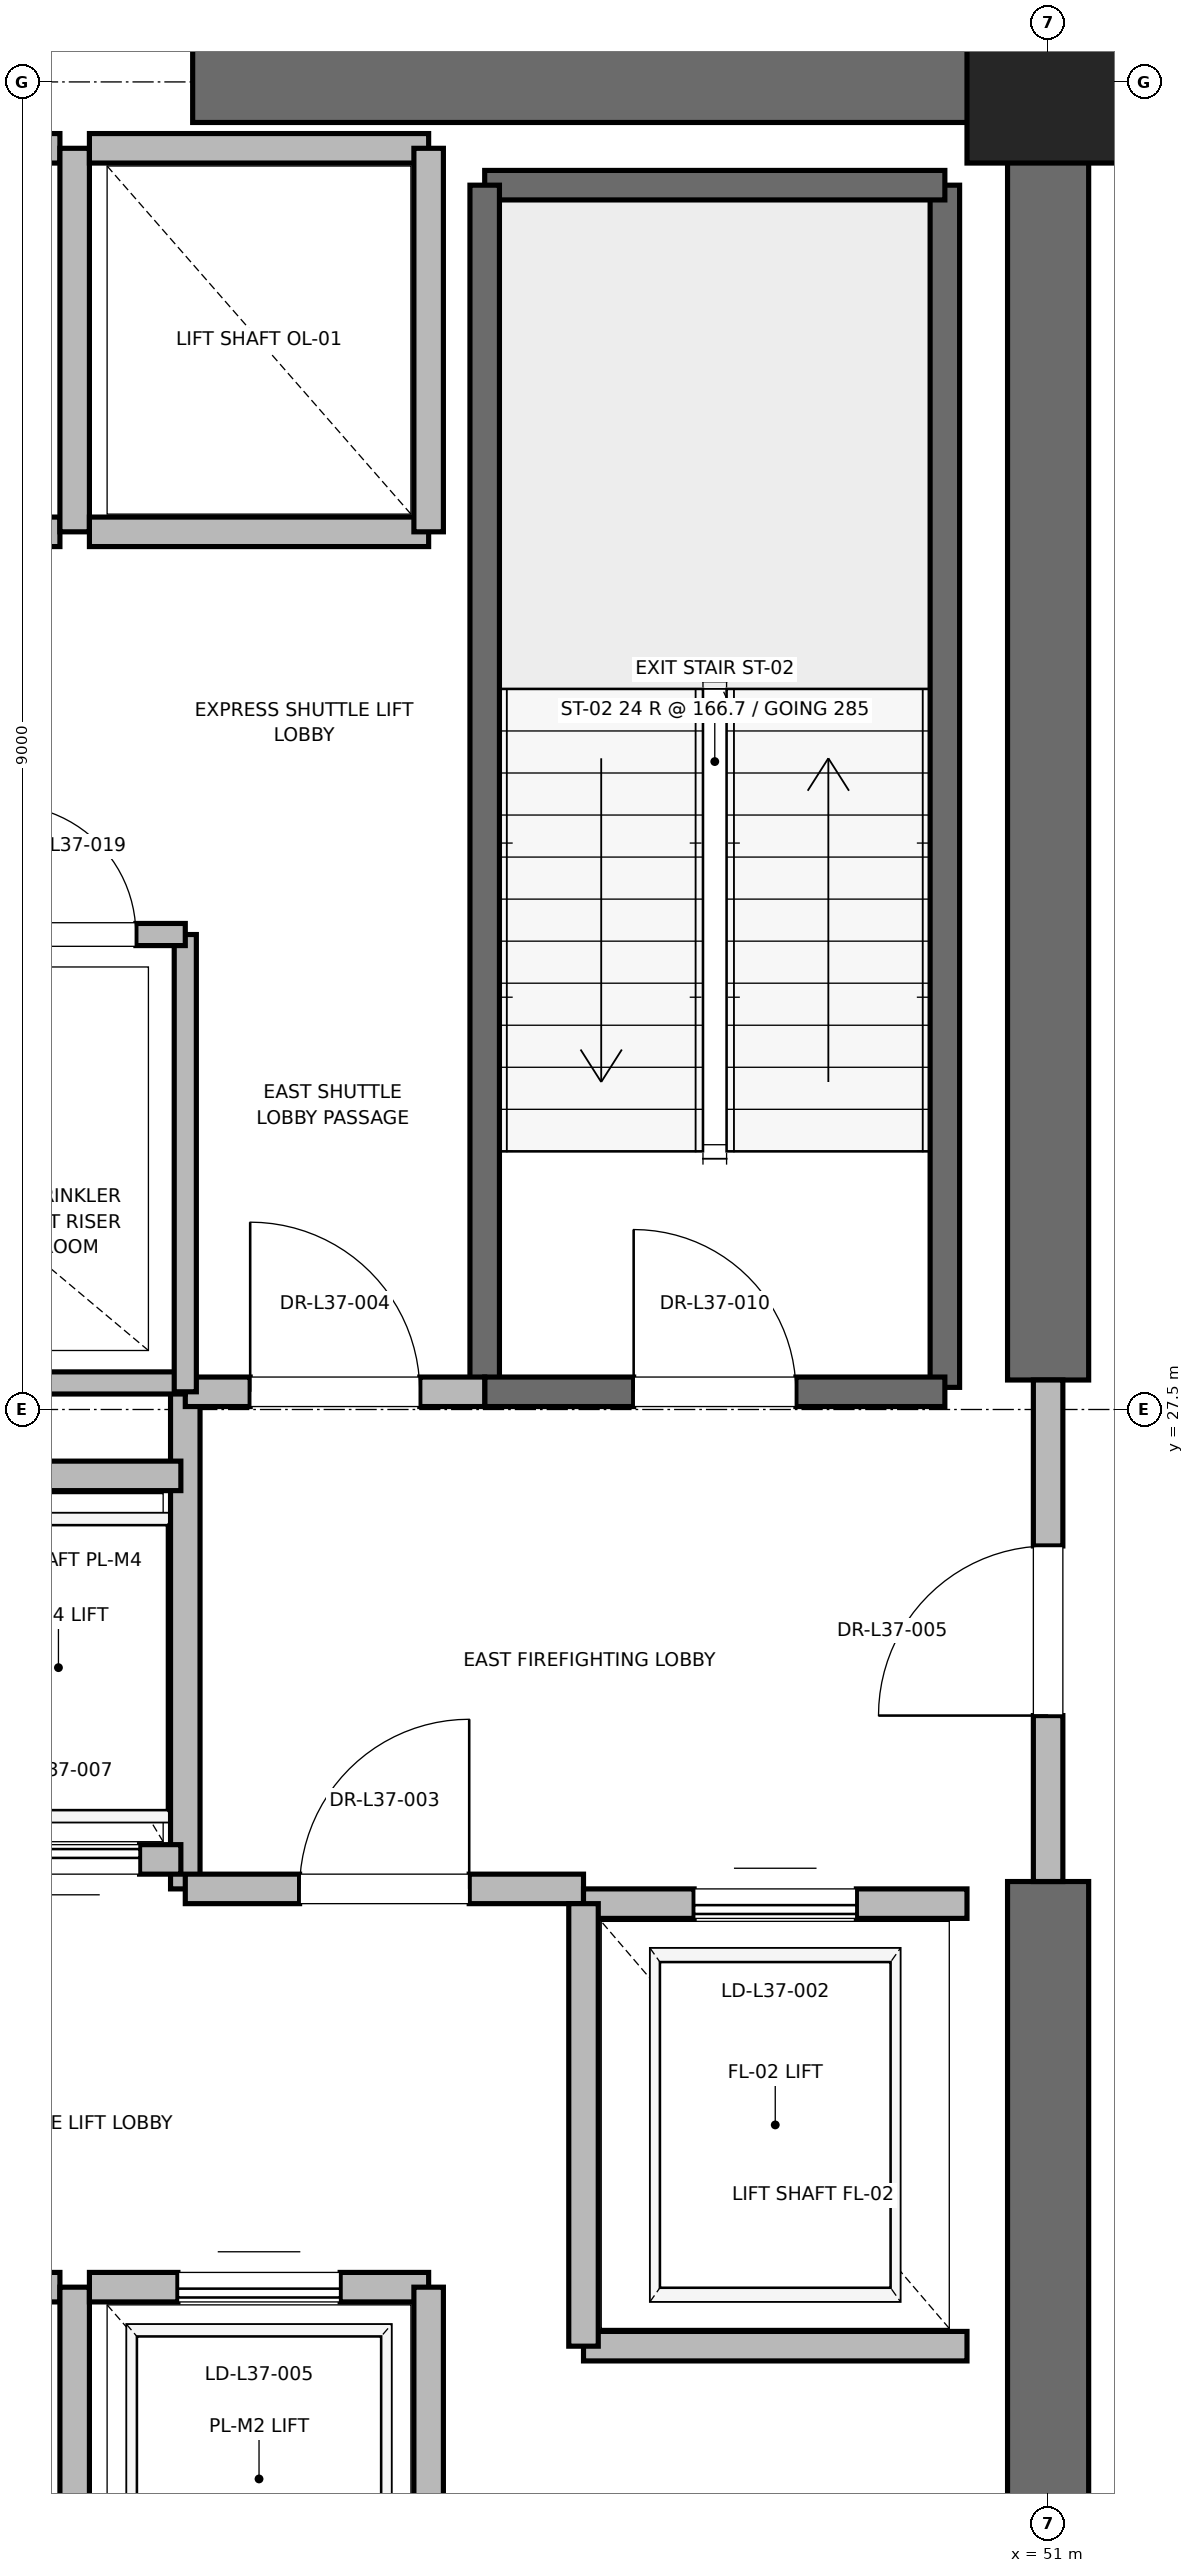
"""IFC4 building model, lengths in metres.
Left out: names, types, materials, properties, quantities, classifications, styles, units other than length and angle.
Written with IfcOpenShell. Run it as: python <this file> out.ifc"""

import sys

from ifc_helpers import new_model, si_unit, direction, frame, frame_2d, origin, origin_2d, place, context, subcontext, project, spatial, rectangle, extrude, element, fill, save


model = new_model("IFC4")
c1 = context("Model", 3, precision=1e-05, world=origin(), true_north=direction((0.0, 1.0)))
c2 = subcontext(c1, "Body", "Model", "MODEL_VIEW")
j1 = project(units=[si_unit("LENGTHUNIT", "METRE"), si_unit("PLANEANGLEUNIT", "RADIAN")], contexts=[c1])
p1 = place(None, origin())
s1 = spatial("IfcSite", under=j1, at=p1, CompositionType="ELEMENT")
p2 = place(p1, origin())
s2 = spatial("IfcBuilding", under=s1, at=p2, CompositionType="ELEMENT")
p3 = place(p2, frame((0.0, 0.0, 160.4)))
s3 = spatial("IfcBuildingStorey", under=s2, at=p3, CompositionType="ELEMENT", Elevation=160.4)
p4 = place(p3, frame((51.0, 36.5, 0.0), z_axis=(0.0, 0.0, 1.0), x_axis=(1.0, 0.0, 0.0)))
e1 = element("IfcColumn", 1, at=p4, inside=s3, PredefinedType="PILASTER", context=c2, shape_type="SweptSolid", body=[
    extrude(rectangle(XDim=1.1, YDim=1.1, at=origin_2d()), origin(), (0.0, 0.0, 1.0), 4.0),
])
for number, where, z_axis, x_axis in (
    (2, (45.2, 36.5, 0.0), (0.0, 0.0, 1.0), (1.0, 0.0, 0.0)),
    (3, (51.0, 18.5, 0.0), (0.0, 0.0, 1.0), (0.0, 1.0, 0.0)),
):
    element("IfcWall", number, at=place(p3, frame(where, z_axis=z_axis, x_axis=x_axis)), inside=s3, PredefinedType="SHEAR", context=c2, shape_type="SweptSolid", body=[
        extrude(rectangle(XDim=5.8, YDim=0.55, at=frame_2d((2.9, 0.0))), origin(), (0.0, 0.0, 1.0), 3.775),
    ])
p5 = place(p3, frame((51.0, 27.7, 0.0), z_axis=(0.0, 0.0, 1.0), x_axis=(0.0, 1.0, 0.0)))
e4 = element("IfcWall", 4, at=p5, inside=s3, PredefinedType="SHEAR", context=c2, shape_type="SweptSolid", body=[
    extrude(rectangle(XDim=8.8, YDim=0.55, at=frame_2d((4.4, 0.0))), origin(), (0.0, 0.0, 1.0), 3.775),
])
p6 = place(p3, frame((50.3, 27.65, 0.0), z_axis=(0.0, 0.0, 1.0), x_axis=(0.0, 1.0, 0.0)))
e5 = element("IfcWall", 5, at=p6, inside=s3, PredefinedType="SOLIDWALL", context=c2, shape_type="SweptSolid", body=[
    extrude(rectangle(XDim=8.15, YDim=0.2, at=frame_2d((4.075, 0.0))), origin(), (0.0, 0.0, 1.0), 3.775),
])
p7 = place(p3, frame((47.18, 35.8, 0.0), z_axis=(0.0, 0.0, 1.0), x_axis=(1.0, 0.0, 0.0)))
e6 = element("IfcWall", 6, at=p7, inside=s3, PredefinedType="SOLIDWALL", context=c2, shape_type="SweptSolid", body=[
    extrude(rectangle(XDim=3.12, YDim=0.2, at=frame_2d((1.56, 0.0))), origin(), (0.0, 0.0, 1.0), 3.775),
])
p8 = place(p3, frame((47.18, 27.62, 0.0), z_axis=(0.0, 0.0, 1.0), x_axis=(0.0, 1.0, 0.0)))
e7 = element("IfcWall", 7, at=p8, inside=s3, PredefinedType="SOLIDWALL", context=c2, shape_type="SweptSolid", body=[
    extrude(rectangle(XDim=8.18, YDim=0.2, at=frame_2d((4.09, 0.0))), origin(), (0.0, 0.0, 1.0), 3.775),
])
p9 = place(p3, frame((47.18, 27.62, 0.0), z_axis=(0.0, 0.0, 1.0), x_axis=(1.0, 0.0, 0.0)))
e8 = element("IfcWall", 8, at=p9, inside=s3, PredefinedType="SOLIDWALL", context=c2, shape_type="SweptSolid", body=[
    extrude(rectangle(XDim=3.12, YDim=0.2, at=frame_2d((1.56, 0.0))), origin(), (0.0, 0.0, 1.0), 3.775),
])
p10 = place(p9, frame((1.01, 0.0, 0.0)))
e9 = element("IfcOpeningElement", 9, at=p10, cuts=e8, PredefinedType="OPENING", context=c2, shape_type="SweptSolid", body=[
    extrude(rectangle(XDim=1.1, YDim=2.15, at=frame_2d((0.55, 1.075))), frame((0.0, 0.1, 0.0), z_axis=(0.0, -1.0, 0.0), x_axis=(1.0, 0.0, 0.0)), (0.0, 0.0, 1.0), 0.2),
])
p11 = place(p3, frame((45.15, 24.25, 0.0), z_axis=(0.0, 0.0, 1.0), x_axis=(0.0, 1.0, 0.0)))
e10 = element("IfcWall", 10, at=p11, inside=s3, PredefinedType="PARTITIONING", context=c2, shape_type="SweptSolid", body=[
    extrude(rectangle(XDim=3.37, YDim=0.2, at=frame_2d((1.685, 0.0))), origin(), (0.0, 0.0, 1.0), 3.775),
])
p12 = place(p3, frame((45.15, 24.25, 0.0), z_axis=(0.0, 0.0, 1.0), x_axis=(1.0, 0.0, 0.0)))
e11 = element("IfcWall", 11, at=p12, inside=s3, PredefinedType="PARTITIONING", context=c2, shape_type="SweptSolid", body=[
    extrude(rectangle(XDim=2.7, YDim=0.2, at=frame_2d((1.35, 0.0))), origin(), (0.0, 0.0, 1.0), 3.775),
])
p13 = place(p12, frame((0.775, 0.0, 0.0)))
e12 = element("IfcOpeningElement", 12, at=p13, cuts=e11, PredefinedType="OPENING", context=c2, shape_type="SweptSolid", body=[
    extrude(rectangle(XDim=1.15, YDim=2.2, at=frame_2d((0.575, 1.1))), frame((0.0, 0.1, 0.0), z_axis=(0.0, -1.0, 0.0), x_axis=(1.0, 0.0, 0.0)), (0.0, 0.0, 1.0), 0.2),
])
p14 = place(p3, frame((45.15, 27.62, 0.0), z_axis=(0.0, 0.0, 1.0), x_axis=(1.0, 0.0, 0.0)))
e13 = element("IfcWall", 13, at=p14, inside=s3, PredefinedType="PARTITIONING", context=c2, shape_type="SweptSolid", body=[
    extrude(rectangle(XDim=2.03, YDim=0.2, at=frame_2d((1.015, 0.0))), origin(), (0.0, 0.0, 1.0), 3.775),
])
p15 = place(p14, frame((0.44, 0.0, 0.0)))
e14 = element("IfcOpeningElement", 14, at=p15, cuts=e13, PredefinedType="OPENING", context=c2, shape_type="SweptSolid", body=[
    extrude(rectangle(XDim=1.15, YDim=2.2, at=frame_2d((0.575, 1.1))), frame((0.0, 0.1, 0.0), z_axis=(0.0, -1.0, 0.0), x_axis=(1.0, 0.0, 0.0)), (0.0, 0.0, 1.0), 0.2),
])
p16 = place(p3, frame((51.0, 24.3, 0.0), z_axis=(0.0, 0.0, 1.0), x_axis=(0.0, 1.0, 0.0)))
e15 = element("IfcWall", 15, at=p16, inside=s3, PredefinedType="PARTITIONING", context=c2, shape_type="SweptSolid", body=[
    extrude(rectangle(XDim=3.4, YDim=0.2, at=frame_2d((1.7, 0.0))), origin(), (0.0, 0.0, 1.0), 2.755),
])
p17 = place(p16, frame((1.125, 0.0, 0.0)))
e16 = element("IfcOpeningElement", 16, at=p17, cuts=e15, PredefinedType="OPENING", context=c2, shape_type="SweptSolid", body=[
    extrude(rectangle(XDim=1.15, YDim=2.2, at=frame_2d((0.575, 1.1))), frame((0.0, 0.1, 0.0), z_axis=(0.0, -1.0, 0.0), x_axis=(1.0, 0.0, 0.0)), (0.0, 0.0, 1.0), 0.2),
])
p18 = place(p3, frame((47.85, 21.15, 0.0), z_axis=(0.0, 0.0, 1.0), x_axis=(1.0, 0.0, 0.0)))
e17 = element("IfcWall", 17, at=p18, inside=s3, PredefinedType="SOLIDWALL", context=c2, shape_type="SweptSolid", body=[
    extrude(rectangle(XDim=2.6, YDim=0.2, at=frame_2d((1.3, 0.0))), origin(), (0.0, 0.0, 1.0), 3.775),
])
p19 = place(p3, frame((50.45, 24.15, 0.0), z_axis=(0.0, 0.0, 1.0), x_axis=(-1.0, 0.0, 0.0)))
e18 = element("IfcWall", 18, at=p19, inside=s3, PredefinedType="SOLIDWALL", context=c2, shape_type="SweptSolid", body=[
    extrude(rectangle(XDim=2.6, YDim=0.2, at=frame_2d((1.3, 0.0))), origin(), (0.0, 0.0, 1.0), 2.755),
])
p20 = place(p19, frame((0.75, 0.0, 0.0)))
e19 = element("IfcOpeningElement", 19, at=p20, cuts=e18, PredefinedType="OPENING", context=c2, shape_type="SweptSolid", body=[
    extrude(rectangle(XDim=1.1, YDim=2.2, at=frame_2d((0.55, 1.1))), frame((0.0, 0.1, 0.0), z_axis=(0.0, -1.0, 0.0), x_axis=(1.0, 0.0, 0.0)), (0.0, 0.0, 1.0), 0.2),
])
p21 = place(p3, frame((47.85, 24.15, 0.0), z_axis=(0.0, 0.0, 1.0), x_axis=(0.0, -1.0, 0.0)))
e20 = element("IfcWall", 20, at=p21, inside=s3, PredefinedType="SOLIDWALL", context=c2, shape_type="SweptSolid", body=[
    extrude(rectangle(XDim=3.0, YDim=0.2, at=frame_2d((1.5, 0.0))), origin(), (0.0, 0.0, 1.0), 3.775),
])
p22 = place(p3, frame((44.3, 21.55, 0.0), z_axis=(0.0, 0.0, 1.0), x_axis=(-1.0, 0.0, 0.0)))
e21 = element("IfcWall", 21, at=p22, inside=s3, PredefinedType="SOLIDWALL", context=c2, shape_type="SweptSolid", body=[
    extrude(rectangle(XDim=2.3, YDim=0.2, at=frame_2d((1.15, 0.0))), origin(), (0.0, 0.0, 1.0), 3.775),
])
p23 = place(p22, frame((0.6, 0.0, 0.0)))
e22 = element("IfcOpeningElement", 22, at=p23, cuts=e21, PredefinedType="OPENING", context=c2, shape_type="SweptSolid", body=[
    extrude(rectangle(XDim=1.1, YDim=2.2, at=frame_2d((0.55, 1.1))), frame((0.0, 0.1, 0.0), z_axis=(0.0, -1.0, 0.0), x_axis=(1.0, 0.0, 0.0)), (0.0, 0.0, 1.0), 0.2),
])
p24 = place(p3, frame((44.4, 18.95, 0.0), z_axis=(0.0, 0.0, 1.0), x_axis=(0.0, 1.0, 0.0)))
e23 = element("IfcWall", 23, at=p24, inside=s3, PredefinedType="SOLIDWALL", context=c2, shape_type="SweptSolid", body=[
    extrude(rectangle(XDim=2.6, YDim=0.2, at=frame_2d((1.3, 0.0))), origin(), (0.0, 0.0, 1.0), 3.775),
])
p25 = place(p3, frame((46.8, 21.55, 0.0), z_axis=(0.0, 0.0, 1.0), x_axis=(-1.0, 0.0, 0.0)))
e24 = element("IfcWall", 24, at=p25, inside=s3, PredefinedType="SOLIDWALL", context=c2, shape_type="SweptSolid", body=[
    extrude(rectangle(XDim=2.3, YDim=0.2, at=frame_2d((1.15, 0.0))), origin(), (0.0, 0.0, 1.0), 3.775),
])
p26 = place(p25, frame((0.6, 0.0, 0.0)))
e25 = element("IfcOpeningElement", 25, at=p26, cuts=e24, PredefinedType="OPENING", context=c2, shape_type="SweptSolid", body=[
    extrude(rectangle(XDim=1.1, YDim=2.2, at=frame_2d((0.55, 1.1))), frame((0.0, 0.1, 0.0), z_axis=(0.0, -1.0, 0.0), x_axis=(1.0, 0.0, 0.0)), (0.0, 0.0, 1.0), 0.2),
])
p27 = place(p3, frame((46.8, 18.95, 0.0), z_axis=(0.0, 0.0, 1.0), x_axis=(0.0, 1.0, 0.0)))
e26 = element("IfcWall", 26, at=p27, inside=s3, PredefinedType="SOLIDWALL", context=c2, shape_type="SweptSolid", body=[
    extrude(rectangle(XDim=2.6, YDim=0.2, at=frame_2d((1.3, 0.0))), origin(), (0.0, 0.0, 1.0), 3.775),
])
p28 = place(p3, frame((43.46, 24.45, 0.0), z_axis=(0.0, 0.0, 1.0), x_axis=(1.0, 0.0, 0.0)))
e27 = element("IfcWall", 27, at=p28, inside=s3, PredefinedType="SOLIDWALL", context=c2, shape_type="SweptSolid", body=[
    extrude(rectangle(XDim=1.66, YDim=0.2, at=frame_2d((0.83, 0.0))), origin(), (0.0, 0.0, 1.0), 3.775),
])
p29 = place(p28, frame((0.28, 0.0, 0.0)))
e28 = element("IfcOpeningElement", 28, at=p29, cuts=e27, PredefinedType="OPENING", context=c2, shape_type="SweptSolid", body=[
    extrude(rectangle(XDim=1.1, YDim=2.2, at=frame_2d((0.55, 1.1))), frame((0.0, 0.1, 0.0), z_axis=(0.0, -1.0, 0.0), x_axis=(1.0, 0.0, 0.0)), (0.0, 0.0, 1.0), 0.2),
])
p30 = place(p3, frame((45.12, 27.05, 0.0), z_axis=(0.0, 0.0, 1.0), x_axis=(-1.0, 0.0, 0.0)))
e29 = element("IfcWall", 29, at=p30, inside=s3, PredefinedType="SOLIDWALL", context=c2, shape_type="SweptSolid", body=[
    extrude(rectangle(XDim=1.66, YDim=0.2, at=frame_2d((0.83, 0.0))), origin(), (0.0, 0.0, 1.0), 3.775),
])
p31 = place(p3, frame((42.0, 33.45, 0.0), z_axis=(0.0, 0.0, 1.0), x_axis=(1.0, 0.0, 0.0)))
e30 = element("IfcWall", 30, at=p31, inside=s3, PredefinedType="SOLIDWALL", context=c2, shape_type="SweptSolid", body=[
    extrude(rectangle(XDim=2.3, YDim=0.2, at=frame_2d((1.15, 0.0))), origin(), (0.0, 0.0, 1.0), 3.775),
])
p32 = place(p3, frame((44.3, 36.05, 0.0), z_axis=(0.0, 0.0, 1.0), x_axis=(-1.0, 0.0, 0.0)))
e31 = element("IfcWall", 31, at=p32, inside=s3, PredefinedType="SOLIDWALL", context=c2, shape_type="SweptSolid", body=[
    extrude(rectangle(XDim=2.3, YDim=0.2, at=frame_2d((1.15, 0.0))), origin(), (0.0, 0.0, 1.0), 2.755),
])
p33 = place(p3, frame((44.4, 33.45, 0.0), z_axis=(0.0, 0.0, 1.0), x_axis=(0.0, 1.0, 0.0)))
e32 = element("IfcWall", 32, at=p33, inside=s3, PredefinedType="SOLIDWALL", context=c2, shape_type="SweptSolid", body=[
    extrude(rectangle(XDim=2.6, YDim=0.2, at=frame_2d((1.3, 0.0))), origin(), (0.0, 0.0, 1.0), 2.755),
])
p34 = place(p3, frame((44.5, 33.45, 0.0), z_axis=(0.0, 0.0, 1.0), x_axis=(1.0, 0.0, 0.0)))
e33 = element("IfcWall", 33, at=p34, inside=s3, PredefinedType="SOLIDWALL", context=c2, shape_type="SweptSolid", body=[
    extrude(rectangle(XDim=2.3, YDim=0.2, at=frame_2d((1.15, 0.0))), origin(), (0.0, 0.0, 1.0), 3.775),
])
p35 = place(p3, frame((46.8, 36.05, 0.0), z_axis=(0.0, 0.0, 1.0), x_axis=(-1.0, 0.0, 0.0)))
e34 = element("IfcWall", 34, at=p35, inside=s3, PredefinedType="SOLIDWALL", context=c2, shape_type="SweptSolid", body=[
    extrude(rectangle(XDim=2.3, YDim=0.2, at=frame_2d((1.15, 0.0))), origin(), (0.0, 0.0, 1.0), 2.755),
])
p36 = place(p3, frame((46.8, 33.45, 0.0), z_axis=(0.0, 0.0, 1.0), x_axis=(0.0, 1.0, 0.0)))
e35 = element("IfcWall", 35, at=p36, inside=s3, PredefinedType="SOLIDWALL", context=c2, shape_type="SweptSolid", body=[
    extrude(rectangle(XDim=2.6, YDim=0.2, at=frame_2d((1.3, 0.0))), origin(), (0.0, 0.0, 1.0), 3.775),
])
p37 = place(p3, frame((41.56, 27.68, 0.0), z_axis=(0.0, 0.0, 1.0), x_axis=(1.0, 0.0, 0.0)))
e36 = element("IfcWall", 36, at=p37, inside=s3, PredefinedType="PARTITIONING", context=c2, shape_type="SweptSolid", body=[
    extrude(rectangle(XDim=3.59, YDim=0.15, at=frame_2d((1.795, 0.0))), origin(), (0.0, 0.0, 1.0), 2.85),
])
p38 = place(p3, frame((45.15, 27.62, 0.0), z_axis=(0.0, 0.0, 1.0), x_axis=(0.0, 1.0, 0.0)))
e37 = element("IfcWall", 37, at=p38, inside=s3, PredefinedType="PARTITIONING", context=c2, shape_type="SweptSolid", body=[
    extrude(rectangle(XDim=3.1, YDim=0.15, at=frame_2d((1.55, 0.0))), origin(), (0.0, 0.0, 1.0), 2.85),
])
p39 = place(p3, frame((43.6, 30.72, 0.0), z_axis=(0.0, 0.0, 1.0), x_axis=(1.0, 0.0, 0.0)))
e38 = element("IfcWall", 38, at=p39, inside=s3, PredefinedType="PARTITIONING", context=c2, shape_type="SweptSolid", body=[
    extrude(rectangle(XDim=1.55, YDim=0.15, at=frame_2d((0.775, 0.0))), origin(), (0.0, 0.0, 1.0), 2.85),
])
p40 = place(p39, frame((0.335, 0.0, 0.0)))
e39 = element("IfcOpeningElement", 39, at=p40, cuts=e38, PredefinedType="OPENING", context=c2, shape_type="SweptSolid", body=[
    extrude(rectangle(XDim=0.88, YDim=2.1, at=frame_2d((0.44, 1.05))), frame((0.0, 0.075, 0.0), z_axis=(0.0, -1.0, 0.0), x_axis=(1.0, 0.0, 0.0)), (0.0, 0.0, 1.0), 0.15),
])
p41 = place(p10, origin())
e40 = element("IfcDoor", 40, at=p41, inside=s3, OperationType="SINGLE_SWING_LEFT", PredefinedType="DOOR", context=c2, shape_type="SweptSolid", body=[
    extrude(rectangle(XDim=1.1, YDim=2.15, at=frame_2d((0.55, 1.075))), frame((0.0, 0.025, 0.0), z_axis=(0.0, -1.0, 0.0), x_axis=(1.0, 0.0, 0.0)), (0.0, 0.0, 1.0), 0.05),
])
fill(e9, e40)
p42 = place(p13, origin())
e41 = element("IfcDoor", 41, at=p42, inside=s3, OperationType="SINGLE_SWING_RIGHT", PredefinedType="DOOR", context=c2, shape_type="SweptSolid", body=[
    extrude(rectangle(XDim=1.15, YDim=2.2, at=frame_2d((0.575, 1.1))), frame((0.0, 0.025, 0.0), z_axis=(0.0, -1.0, 0.0), x_axis=(1.0, 0.0, 0.0)), (0.0, 0.0, 1.0), 0.05),
])
fill(e12, e41)
p43 = place(p15, origin())
e42 = element("IfcDoor", 42, at=p43, inside=s3, OperationType="SINGLE_SWING_LEFT", PredefinedType="DOOR", context=c2, shape_type="SweptSolid", body=[
    extrude(rectangle(XDim=1.15, YDim=2.2, at=frame_2d((0.575, 1.1))), frame((0.0, 0.025, 0.0), z_axis=(0.0, -1.0, 0.0), x_axis=(1.0, 0.0, 0.0)), (0.0, 0.0, 1.0), 0.05),
])
fill(e14, e42)
p44 = place(p17, origin())
e43 = element("IfcDoor", 43, at=p44, inside=s3, OperationType="SINGLE_SWING_LEFT", PredefinedType="DOOR", context=c2, shape_type="SweptSolid", body=[
    extrude(rectangle(XDim=1.15, YDim=2.2, at=frame_2d((0.575, 1.1))), frame((0.0, 0.025, 0.0), z_axis=(0.0, -1.0, 0.0), x_axis=(1.0, 0.0, 0.0)), (0.0, 0.0, 1.0), 0.05),
])
fill(e16, e43)
p45 = place(p20, origin())
e44 = element("IfcDoor", 44, at=p45, inside=s3, OperationType="SLIDING_TO_RIGHT", PredefinedType="DOOR", context=c2, shape_type="SweptSolid", body=[
    extrude(rectangle(XDim=1.1, YDim=2.2, at=frame_2d((0.55, 1.1))), frame((0.0, 0.025, 0.0), z_axis=(0.0, -1.0, 0.0), x_axis=(1.0, 0.0, 0.0)), (0.0, 0.0, 1.0), 0.05),
])
fill(e19, e44)
p46 = place(p26, origin())
e45 = element("IfcDoor", 45, at=p46, inside=s3, OperationType="SLIDING_TO_RIGHT", PredefinedType="DOOR", context=c2, shape_type="SweptSolid", body=[
    extrude(rectangle(XDim=1.1, YDim=2.2, at=frame_2d((0.55, 1.1))), frame((0.0, 0.025, 0.0), z_axis=(0.0, -1.0, 0.0), x_axis=(1.0, 0.0, 0.0)), (0.0, 0.0, 1.0), 0.05),
])
fill(e25, e45)
p47 = place(p29, origin())
e46 = element("IfcDoor", 46, at=p47, inside=s3, OperationType="SLIDING_TO_RIGHT", PredefinedType="DOOR", context=c2, shape_type="SweptSolid", body=[
    extrude(rectangle(XDim=1.1, YDim=2.2, at=frame_2d((0.55, 1.1))), frame((0.0, 0.025, 0.0), z_axis=(0.0, -1.0, 0.0), x_axis=(1.0, 0.0, 0.0)), (0.0, 0.0, 1.0), 0.05),
])
fill(e28, e46)
p48 = place(p40, origin())
e47 = element("IfcDoor", 47, at=p48, inside=s3, OperationType="SINGLE_SWING_LEFT", PredefinedType="DOOR", context=c2, shape_type="SweptSolid", body=[
    extrude(rectangle(XDim=0.88, YDim=2.1, at=frame_2d((0.44, 1.05))), frame((0.0, 0.025, 0.0), z_axis=(0.0, -1.0, 0.0), x_axis=(1.0, 0.0, 0.0)), (0.0, 0.0, 1.0), 0.05),
])
fill(e39, e47)
save(model, sys.argv[1])
